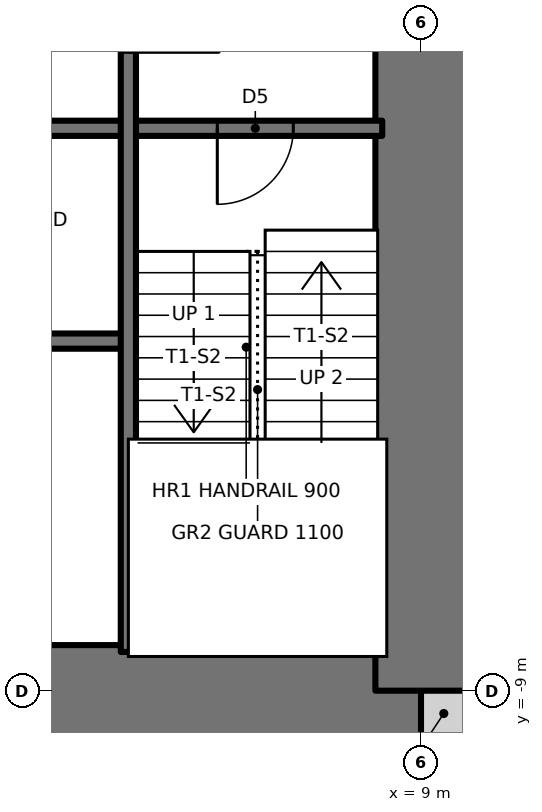
"""IFC4 building model, lengths in metres.
Left out: names, types, materials, properties, quantities, classifications, styles, units other than length and angle.
Written with IfcOpenShell. Run it as: python <this file> out.ifc"""

import sys

from ifc_helpers import new_model, si_unit, direction, frame, frame_2d, origin, place, context, subcontext, project, spatial, rectangle, extrude, element, fill, save


model = new_model("IFC4")
c1 = context("Model", 3, precision=1e-05, world=origin(), true_north=direction((0.0, 1.0)))
c2 = subcontext(c1, "Body", "Model", "MODEL_VIEW")
j1 = project(units=[si_unit("LENGTHUNIT", "METRE"), si_unit("PLANEANGLEUNIT", "RADIAN")], contexts=[c1])
p1 = place(None, origin())
s1 = spatial("IfcSite", under=j1, at=p1, CompositionType="ELEMENT")
p2 = place(p1, origin())
s2 = spatial("IfcBuilding", under=s1, at=p2, CompositionType="ELEMENT")
p3 = place(p2, frame((0.0, 0.0, 229.0)))
s3 = spatial("IfcBuildingStorey", under=s2, at=p3, CompositionType="ELEMENT", Elevation=229.0)
p4 = place(p3, frame((9.0, -9.3, 0.0), z_axis=(0.0, 0.0, 1.0), x_axis=(1.0, 0.0, 0.0)))
e1 = element("IfcWall", 1, at=p4, inside=s3, PredefinedType="SOLIDWALL", context=c2, shape_type="SweptSolid", body=[
    extrude(rectangle(XDim=0.6, YDim=0.6, at=frame_2d((0.3, 0.0))), origin(), (0.0, 0.0, 1.0), 3.5),
])
p5 = place(p3, frame((-9.0, -9.0, 0.0), z_axis=(0.0, 0.0, 1.0), x_axis=(1.0, 0.0, 0.0)))
e2 = element("IfcWall", 2, at=p5, inside=s3, PredefinedType="SHEAR", context=c2, shape_type="SweptSolid", body=[
    extrude(rectangle(XDim=18.0, YDim=1.2, at=frame_2d((9.0, 0.0))), origin(), (0.0, 0.0, 1.0), 3.5),
])
p6 = place(p5, frame((3.775, 0.0, 0.0)))
e3 = element("IfcOpeningElement", 3, at=p6, cuts=e2, PredefinedType="OPENING", context=c2, shape_type="SweptSolid", body=[
    extrude(rectangle(XDim=0.9, YDim=2.1, at=frame_2d((0.45, 1.05))), frame((0.0, 0.61, 0.0), z_axis=(0.0, -1.0, 0.0), x_axis=(1.0, 0.0, 0.0)), (0.0, 0.0, 1.0), 1.22),
])
p7 = place(p5, frame((10.625, 0.0, 0.0)))
e4 = element("IfcOpeningElement", 4, at=p7, cuts=e2, PredefinedType="OPENING", context=c2, shape_type="SweptSolid", body=[
    extrude(rectangle(XDim=0.9, YDim=2.1, at=frame_2d((0.45, 1.05))), frame((0.0, 0.61, 0.0), z_axis=(0.0, -1.0, 0.0), x_axis=(1.0, 0.0, 0.0)), (0.0, 0.0, 1.0), 1.22),
])
p8 = place(p3, frame((9.0, -9.0, 0.0), z_axis=(0.0, 0.0, 1.0), x_axis=(0.0, 1.0, 0.0)))
e5 = element("IfcWall", 5, at=p8, inside=s3, PredefinedType="SHEAR", context=c2, shape_type="SweptSolid", body=[
    extrude(rectangle(XDim=18.0, YDim=1.2, at=frame_2d((9.0, 0.0))), origin(), (0.0, 0.0, 1.0), 3.5),
])
p9 = place(p8, frame((8.5, 0.0, 0.0)))
e6 = element("IfcOpeningElement", 6, at=p9, cuts=e5, PredefinedType="OPENING", context=c2, shape_type="SweptSolid", body=[
    extrude(rectangle(XDim=1.0, YDim=2.1, at=frame_2d((0.5, 1.05))), frame((0.0, 0.61, 0.0), z_axis=(0.0, -1.0, 0.0), x_axis=(1.0, 0.0, 0.0)), (0.0, 0.0, 1.0), 1.22),
])
p10 = place(p3, frame((-8.49, -4.4, 0.0), z_axis=(0.0, 0.0, 1.0), x_axis=(1.0, 0.0, 0.0)))
e7 = element("IfcWall", 7, at=p10, inside=s3, PredefinedType="SOLIDWALL", context=c2, shape_type="SweptSolid", body=[
    extrude(rectangle(XDim=13.64, YDim=0.2, at=frame_2d((6.82, 0.0))), origin(), (0.0, 0.0, 1.0), 3.5),
])
p11 = place(p3, frame((-8.49, -1.6, 0.0), z_axis=(0.0, 0.0, 1.0), x_axis=(1.0, 0.0, 0.0)))
e8 = element("IfcWall", 8, at=p11, inside=s3, PredefinedType="SOLIDWALL", context=c2, shape_type="SweptSolid", body=[
    extrude(rectangle(XDim=16.98, YDim=0.2, at=frame_2d((8.49, 0.0))), origin(), (0.0, 0.0, 1.0), 3.5),
])
p12 = place(p11, frame((14.81, 0.0, 0.0)))
e9 = element("IfcOpeningElement", 9, at=p12, cuts=e8, PredefinedType="OPENING", context=c2, shape_type="SweptSolid", body=[
    extrude(rectangle(XDim=1.0, YDim=2.1, at=frame_2d((0.5, 1.05))), frame((0.0, 0.11, 0.0), z_axis=(0.0, -1.0, 0.0), x_axis=(1.0, 0.0, 0.0)), (0.0, 0.0, 1.0), 0.22),
])
p13 = place(p11, frame((1.232, 0.0, 0.0)))
e10 = element("IfcOpeningElement", 10, at=p13, cuts=e8, PredefinedType="OPENING", context=c2, shape_type="SweptSolid", body=[
    extrude(rectangle(XDim=0.9, YDim=2.1, at=frame_2d((0.45, 1.05))), frame((0.0, 0.11, 0.0), z_axis=(0.0, -1.0, 0.0), x_axis=(1.0, 0.0, 0.0)), (0.0, 0.0, 1.0), 0.22),
])
p14 = place(p11, frame((5.57, 0.0, 0.0)))
e11 = element("IfcOpeningElement", 11, at=p14, cuts=e8, PredefinedType="OPENING", context=c2, shape_type="SweptSolid", body=[
    extrude(rectangle(XDim=0.9, YDim=2.1, at=frame_2d((0.45, 1.05))), frame((0.0, 0.11, 0.0), z_axis=(0.0, -1.0, 0.0), x_axis=(1.0, 0.0, 0.0)), (0.0, 0.0, 1.0), 0.22),
])
p15 = place(p11, frame((3.857, 0.0, 0.0)))
e12 = element("IfcOpeningElement", 12, at=p15, cuts=e8, PredefinedType="OPENING", context=c2, shape_type="SweptSolid", body=[
    extrude(rectangle(XDim=0.9, YDim=2.1, at=frame_2d((0.45, 1.05))), frame((0.0, 0.11, 0.0), z_axis=(0.0, -1.0, 0.0), x_axis=(1.0, 0.0, 0.0)), (0.0, 0.0, 1.0), 0.22),
])
p16 = place(p11, frame((8.052, 0.0, 0.0)))
e13 = element("IfcOpeningElement", 13, at=p16, cuts=e8, PredefinedType="OPENING", context=c2, shape_type="SweptSolid", body=[
    extrude(rectangle(XDim=0.9, YDim=2.1, at=frame_2d((0.45, 1.05))), frame((0.0, 0.11, 0.0), z_axis=(0.0, -1.0, 0.0), x_axis=(1.0, 0.0, 0.0)), (0.0, 0.0, 1.0), 0.22),
])
p17 = place(p11, frame((11.478, 0.0, 0.0)))
e14 = element("IfcOpeningElement", 14, at=p17, cuts=e8, PredefinedType="OPENING", context=c2, shape_type="SweptSolid", body=[
    extrude(rectangle(XDim=0.9, YDim=2.1, at=frame_2d((0.45, 1.05))), frame((0.0, 0.11, 0.0), z_axis=(0.0, -1.0, 0.0), x_axis=(1.0, 0.0, 0.0)), (0.0, 0.0, 1.0), 0.22),
])
p18 = place(p3, frame((5.15, -8.49, 0.0), z_axis=(0.0, 0.0, 1.0), x_axis=(0.0, 1.0, 0.0)))
e15 = element("IfcWall", 15, at=p18, inside=s3, PredefinedType="SOLIDWALL", context=c2, shape_type="SweptSolid", body=[
    extrude(rectangle(XDim=13.09, YDim=0.2, at=frame_2d((6.545, 0.0))), origin(), (0.0, 0.0, 1.0), 3.5),
])
p19 = place(p18, frame((7.89, 0.0, 0.0)))
e16 = element("IfcOpeningElement", 16, at=p19, cuts=e15, PredefinedType="OPENING", context=c2, shape_type="SweptSolid", body=[
    extrude(rectangle(XDim=1.2, YDim=2.1, at=frame_2d((0.6, 1.05))), frame((0.0, 0.11, 0.0), z_axis=(0.0, -1.0, 0.0), x_axis=(1.0, 0.0, 0.0)), (0.0, 0.0, 1.0), 0.22),
])
p20 = place(p12, frame((1.0, 0.0, 0.0), z_axis=(0.0, 0.0, 1.0), x_axis=(-1.0, 0.0, 0.0)))
e17 = element("IfcDoor", 17, at=p20, inside=s3, OperationType="SINGLE_SWING_RIGHT", PredefinedType="DOOR", context=c2, shape_type="SweptSolid", body=[
    extrude(rectangle(XDim=1.0, YDim=2.1, at=frame_2d((0.5, 1.05))), frame((0.0, 0.025, 0.0), z_axis=(0.0, -1.0, 0.0), x_axis=(1.0, 0.0, 0.0)), (0.0, 0.0, 1.0), 0.05),
])
fill(e9, e17)
p21 = place(p19, frame((1.2, 0.0, 0.0), z_axis=(0.0, 0.0, 1.0), x_axis=(-1.0, 0.0, 0.0)))
e18 = element("IfcDoor", 18, at=p21, inside=s3, OperationType="SINGLE_SWING_RIGHT", PredefinedType="DOOR", context=c2, shape_type="SweptSolid", body=[
    extrude(rectangle(XDim=1.2, YDim=2.1, at=frame_2d((0.6, 1.05))), frame((0.0, 0.025, 0.0), z_axis=(0.0, -1.0, 0.0), x_axis=(1.0, 0.0, 0.0)), (0.0, 0.0, 1.0), 0.05),
])
fill(e16, e18)
save(model, sys.argv[1])
